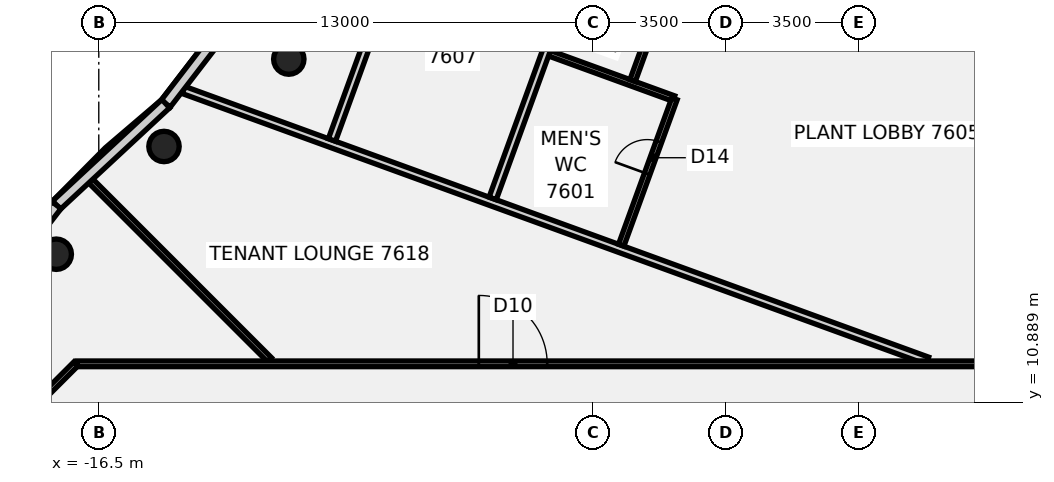
"""IFC4 building model, lengths in metres.
Left out: names, types, materials, properties, quantities, classifications, styles, units other than length and angle.
Written with IfcOpenShell. Run it as: python <this file> out.ifc"""

import sys

from ifc_helpers import new_model, si_unit, direction, frame, frame_2d, origin, origin_2d, place, context, subcontext, project, spatial, rectangle, circle, extrude, element, fill, save


model = new_model("IFC4")
c1 = context("Model", 3, precision=1e-05, world=origin(), true_north=direction((0.0, 1.0)))
c2 = subcontext(c1, "Body", "Model", "MODEL_VIEW")
j1 = project(units=[si_unit("LENGTHUNIT", "METRE"), si_unit("PLANEANGLEUNIT", "RADIAN")], contexts=[c1])
p1 = place(None, origin())
s1 = spatial("IfcSite", under=j1, at=p1, CompositionType="ELEMENT")
p2 = place(p1, origin())
s2 = spatial("IfcBuilding", under=s1, at=p2, CompositionType="ELEMENT")
p3 = place(p2, frame((0.0, 0.0, 309.4)))
s3 = spatial("IfcBuildingStorey", under=s2, at=p3, CompositionType="ELEMENT", Elevation=309.4)
for number, where, z_axis, x_axis in (
    (1, (-11.5, 19.919, -0.18), (0.0, 0.0, 1.0), (1.0, 0.0, 0.0)),
    (2, (-14.784, 17.619, -0.18), (0.0, 0.0, 1.0), (1.0, 0.0, 0.0)),
    (3, (-17.619, 14.784, -0.18), (0.0, 0.0, 1.0), (1.0, 0.0, 0.0)),
):
    element("IfcColumn", number, at=place(p3, frame(where, z_axis=z_axis, x_axis=x_axis)), inside=s3, PredefinedType="COLUMN", context=c2, shape_type="SweptSolid", body=[
        extrude(circle(Radius=0.4, at=origin_2d()), origin(), (0.0, 0.0, 1.0), 4.0),
    ])
p4 = place(p3, frame((-16.921, 16.921, 0.0), z_axis=(0.0, 0.0, 1.0), x_axis=(0.707106781187, -0.707106781187, 0.0)))
e4 = element("IfcWall", 4, at=p4, inside=s3, PredefinedType="PARTITIONING", context=c2, shape_type="SweptSolid", body=[
    extrude(rectangle(XDim=6.946, YDim=0.15, at=frame_2d((3.473, 0.0))), origin(), (0.0, 0.0, 1.0), 3.22),
])
p5 = place(p3, frame((-14.271, 19.106, 0.0), z_axis=(0.0, 0.0, 1.0), x_axis=(0.939707843555, -0.341978316216, 0.0)))
e5 = element("IfcWall", 5, at=p5, inside=s3, PredefinedType="PARTITIONING", context=c2, shape_type="SweptSolid", body=[
    extrude(rectangle(XDim=20.83, YDim=0.2, at=frame_2d((10.415, 0.0))), origin(), (0.0, 0.0, 1.0), 3.22),
])
p6 = place(p3, frame((-4.64, 20.071, 0.0), z_axis=(0.0, 0.0, 1.0), x_axis=(0.939625353143, -0.342204903138, 0.0)))
e6 = element("IfcWall", 6, at=p6, inside=s3, PredefinedType="PARTITIONING", context=c2, shape_type="SweptSolid", body=[
    extrude(rectangle(XDim=3.48, YDim=0.15, at=frame_2d((1.74, 0.0))), origin(), (0.0, 0.0, 1.0), 3.22),
])
p7 = place(p3, frame((-17.065, 11.9, 0.0), z_axis=(0.0, 0.0, 1.0), x_axis=(1.0, 0.0, 0.0)))
e7 = element("IfcWall", 7, at=p7, inside=s3, PredefinedType="PARTITIONING", context=c2, shape_type="SweptSolid", body=[
    extrude(rectangle(XDim=34.165, YDim=0.15, at=frame_2d((17.083, 0.0))), origin(), (0.0, 0.0, 1.0), 3.22),
])
p8 = place(p7, frame((24.544, 0.0, 0.0)))
e8 = element("IfcOpeningElement", 8, at=p8, cuts=e7, PredefinedType="OPENING", context=c2, shape_type="SweptSolid", body=[
    extrude(rectangle(XDim=1.8, YDim=2.1, at=frame_2d((0.9, 1.05))), frame((0.0, 0.085, 0.0), z_axis=(0.0, -1.0, 0.0), x_axis=(1.0, 0.0, 0.0)), (0.0, 0.0, 1.0), 0.17),
])
p9 = place(p7, frame((30.465, 0.0, 0.0)))
e9 = element("IfcOpeningElement", 9, at=p9, cuts=e7, PredefinedType="OPENING", context=c2, shape_type="SweptSolid", body=[
    extrude(rectangle(XDim=0.9, YDim=2.1, at=frame_2d((0.45, 1.05))), frame((0.0, 0.085, 0.0), z_axis=(0.0, -1.0, 0.0), x_axis=(1.0, 0.0, 0.0)), (0.0, 0.0, 1.0), 0.17),
])
p10 = place(p7, frame((10.565, 0.0, 0.0)))
e10 = element("IfcOpeningElement", 10, at=p10, cuts=e7, PredefinedType="OPENING", context=c2, shape_type="SweptSolid", body=[
    extrude(rectangle(XDim=1.8, YDim=2.1, at=frame_2d((0.9, 1.05))), frame((0.0, 0.085, 0.0), z_axis=(0.0, -1.0, 0.0), x_axis=(1.0, 0.0, 0.0)), (0.0, 0.0, 1.0), 0.17),
])
p11 = place(p3, frame((-18.872, 10.128, 0.0), z_axis=(0.0, 0.0, 1.0), x_axis=(0.707106781187, 0.707106781187, 0.0)))
e11 = element("IfcWall", 11, at=p11, inside=s3, PredefinedType="PARTITIONING", context=c2, shape_type="SweptSolid", body=[
    extrude(rectangle(XDim=2.505, YDim=0.15, at=frame_2d((1.253, 0.0))), origin(), (0.0, 0.0, 1.0), 3.22),
])
p12 = place(p3, frame((-10.365, 17.791, 0.0), z_axis=(0.0, 0.0, 1.0), x_axis=(0.342032792834, 0.939688016645, 0.0)))
e12 = element("IfcWall", 12, at=p12, inside=s3, PredefinedType="PARTITIONING", context=c2, shape_type="SweptSolid", body=[
    extrude(rectangle(XDim=8.66, YDim=0.2, at=frame_2d((4.33, 0.0))), origin(), (0.0, 0.0, 1.0), 3.22),
])
p13 = place(p12, frame((6.6, 0.0, 0.0)))
e13 = element("IfcOpeningElement", 13, at=p13, cuts=e12, PredefinedType="OPENING", context=c2, shape_type="SweptSolid", body=[
    extrude(rectangle(XDim=1.4, YDim=2.1, at=frame_2d((0.7, 1.05))), frame((0.0, 0.11, 0.0), z_axis=(0.0, -1.0, 0.0), x_axis=(1.0, 0.0, 0.0)), (0.0, 0.0, 1.0), 0.22),
])
p14 = place(p3, frame((-6.136, 16.252, 0.0), z_axis=(0.0, 0.0, 1.0), x_axis=(0.341890434998, 0.939739820619, 0.0)))
e14 = element("IfcWall", 14, at=p14, inside=s3, PredefinedType="PARTITIONING", context=c2, shape_type="SweptSolid", body=[
    extrude(rectangle(XDim=6.518, YDim=0.2, at=frame_2d((3.259, 0.0))), origin(), (0.0, 0.0, 1.0), 3.22),
])
p15 = place(p3, frame((-2.753, 15.021, 0.0), z_axis=(0.0, 0.0, 1.0), x_axis=(0.341929559358, 0.939725585709, 0.0)))
e15 = element("IfcWall", 15, at=p15, inside=s3, PredefinedType="PARTITIONING", context=c2, shape_type="SweptSolid", body=[
    extrude(rectangle(XDim=4.099, YDim=0.15, at=frame_2d((2.05, 0.0))), origin(), (0.0, 0.0, 1.0), 3.22),
])
p16 = place(p15, frame((2.0, 0.0, 0.0)))
e16 = element("IfcOpeningElement", 16, at=p16, cuts=e15, PredefinedType="OPENING", context=c2, shape_type="SweptSolid", body=[
    extrude(rectangle(XDim=0.9, YDim=2.1, at=frame_2d((0.45, 1.05))), frame((0.0, 0.085, 0.0), z_axis=(0.0, -1.0, 0.0), x_axis=(1.0, 0.0, 0.0)), (0.0, 0.0, 1.0), 0.17),
])
p17 = place(p3, frame((-2.452, 19.354, 0.0), z_axis=(0.0, 0.0, 1.0), x_axis=(0.341765797908, 0.939785155969, 0.0)))
e17 = element("IfcWall", 17, at=p17, inside=s3, PredefinedType="PARTITIONING", context=c2, shape_type="SweptSolid", body=[
    extrude(rectangle(XDim=1.724, YDim=0.15, at=frame_2d((0.862, 0.0))), origin(), (0.0, 0.0, 1.0), 3.22),
])
p18 = place(p3, frame((-13.409, 20.474, 0.0), z_axis=(0.0, 0.0, 1.0), x_axis=(-0.609396950442, -0.792865282877, 0.0)))
e18 = element("IfcWall", 18, at=p18, inside=s3, PredefinedType="SOLIDWALL", context=c2, shape_type="SweptSolid", body=[
    extrude(rectangle(XDim=2.181, YDim=0.3, at=frame_2d((1.09, 0.0))), origin(), (0.0, 0.0, 1.0), 3.82),
])
p19 = place(p3, frame((-14.739, 18.745, 0.0), z_axis=(0.0, 0.0, 1.0), x_axis=(-0.73266715928, -0.680587124263, 0.0)))
e19 = element("IfcWall", 19, at=p19, inside=s3, PredefinedType="SOLIDWALL", context=c2, shape_type="SweptSolid", body=[
    extrude(rectangle(XDim=3.924, YDim=0.3, at=frame_2d((1.962, 0.0))), origin(), (0.0, 0.0, 1.0), 3.82),
])
p20 = place(p3, frame((-17.613, 16.075, 0.0), z_axis=(0.0, 0.0, 1.0), x_axis=(-0.610785688376, -0.79179596038, 0.0)))
e20 = element("IfcWall", 20, at=p20, inside=s3, PredefinedType="SOLIDWALL", context=c2, shape_type="SweptSolid", body=[
    extrude(rectangle(XDim=3.938, YDim=0.3, at=frame_2d((1.969, 0.0))), origin(), (0.0, 0.0, 1.0), 3.82),
])
p21 = place(p10, origin())
e21 = element("IfcDoor", 21, at=p21, inside=s3, OperationType="DOUBLE_DOOR_SINGLE_SWING", PredefinedType="DOOR", context=c2, shape_type="SweptSolid", body=[
    extrude(rectangle(XDim=1.8, YDim=2.1, at=frame_2d((0.9, 1.05))), frame((0.0, 0.025, 0.0), z_axis=(0.0, -1.0, 0.0), x_axis=(1.0, 0.0, 0.0)), (0.0, 0.0, 1.0), 0.05),
])
fill(e10, e21)
p22 = place(p16, origin())
e22 = element("IfcDoor", 22, at=p22, inside=s3, OperationType="SINGLE_SWING_LEFT", PredefinedType="DOOR", context=c2, shape_type="SweptSolid", body=[
    extrude(rectangle(XDim=0.9, YDim=2.1, at=frame_2d((0.45, 1.05))), frame((0.0, 0.025, 0.0), z_axis=(0.0, -1.0, 0.0), x_axis=(1.0, 0.0, 0.0)), (0.0, 0.0, 1.0), 0.05),
])
fill(e16, e22)
save(model, sys.argv[1])
